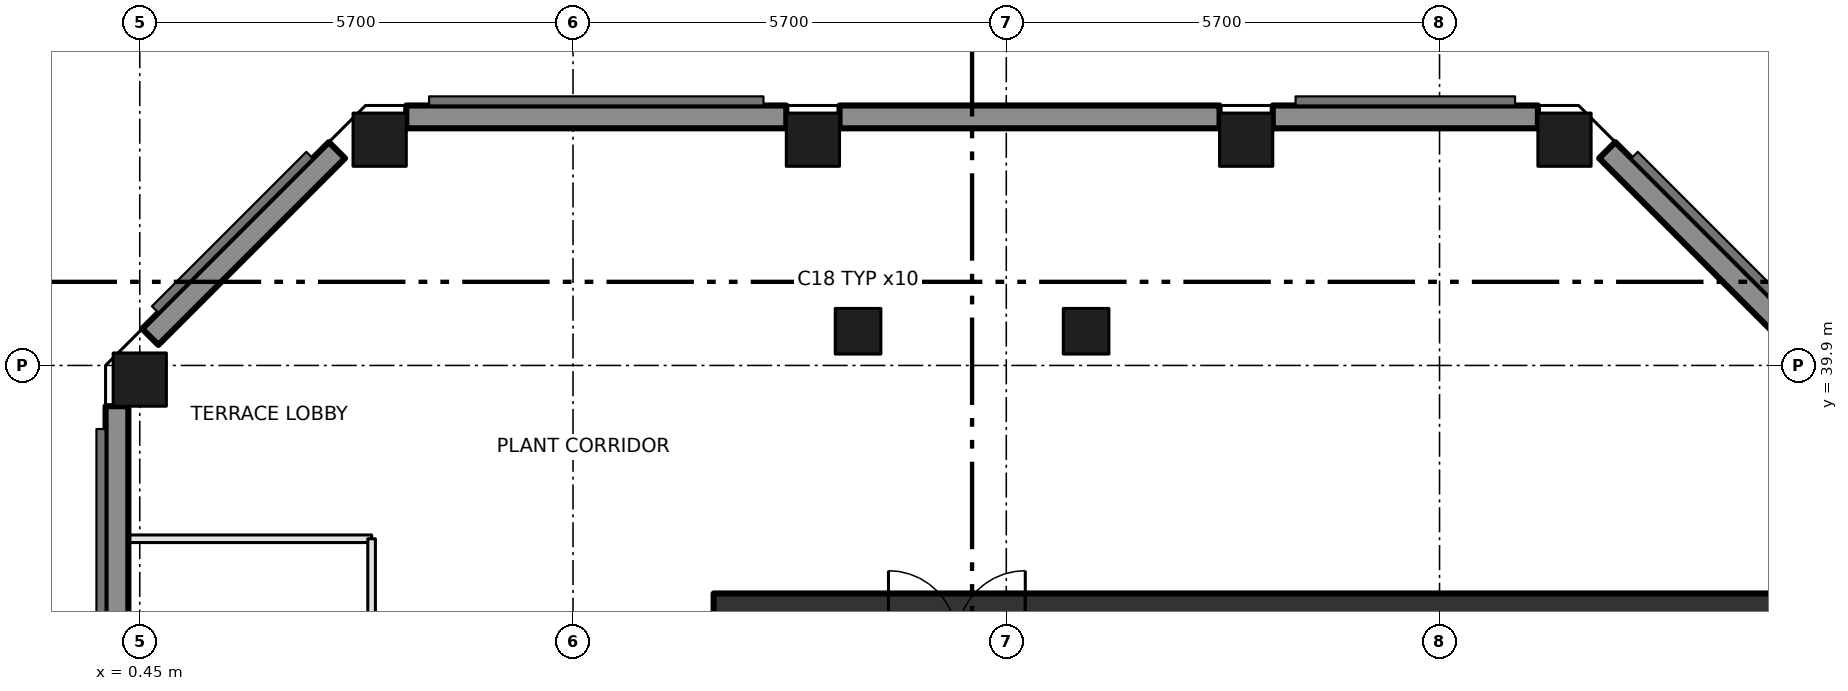
"""IFC4 building model, lengths in metres.
Left out: names, types, materials, properties, quantities, classifications, styles, units other than length and angle.
Written with IfcOpenShell. Run it as: python <this file> out.ifc"""

import sys

from ifc_helpers import new_model, si_unit, direction, frame, frame_2d, origin, origin_2d, place, context, subcontext, project, spatial, rectangle, extrude, element, save


model = new_model("IFC4")
c1 = context("Model", 3, precision=1e-05, world=origin(), true_north=direction((0.0, 1.0)))
c2 = subcontext(c1, "Body", "Model", "MODEL_VIEW")
j1 = project(units=[si_unit("LENGTHUNIT", "METRE"), si_unit("PLANEANGLEUNIT", "RADIAN")], contexts=[c1])
p1 = place(None, origin())
s1 = spatial("IfcSite", under=j1, at=p1, CompositionType="ELEMENT")
p2 = place(p1, origin())
s2 = spatial("IfcBuilding", under=s1, at=p2, CompositionType="ELEMENT")
p3 = place(p2, frame((0.0, 0.0, 414.6)))
s3 = spatial("IfcBuildingStorey", under=s2, at=p3, CompositionType="ELEMENT", Elevation=414.6)
for number, where, z_axis, x_axis in (
    (1, (19.194, 42.87, 0.0), (0.0, 0.0, 1.0), (1.0, 0.0, 0.0)),
    (2, (3.606, 42.87, 0.0), (0.0, 0.0, 1.0), (1.0, 0.0, 0.0)),
    (3, (9.306, 42.87, 0.0), (0.0, 0.0, 1.0), (1.0, 0.0, 0.0)),
    (4, (15.006, 42.87, 0.0), (0.0, 0.0, 1.0), (1.0, 0.0, 0.0)),
    (5, (0.45, 39.714, 0.0), (0.0, 0.0, 1.0), (1.0, 0.0, 0.0)),
):
    element("IfcColumn", number, at=place(p3, frame(where, z_axis=z_axis, x_axis=x_axis)), inside=s3, PredefinedType="COLUMN", context=c2, shape_type="SweptSolid", body=[
        extrude(rectangle(XDim=0.7, YDim=0.7, at=origin_2d()), origin(), (0.0, 0.0, 1.0), 4.8),
    ])
for number, where, z_axis, x_axis in (
    (6, (9.9, 40.35, 0.0), (0.0, 0.0, 1.0), (1.0, 0.0, 0.0)),
    (7, (12.9, 40.35, 0.0), (0.0, 0.0, 1.0), (1.0, 0.0, 0.0)),
):
    element("IfcColumn", number, at=place(p3, frame(where, z_axis=z_axis, x_axis=x_axis)), inside=s3, PredefinedType="COLUMN", context=c2, shape_type="SweptSolid", body=[
        extrude(rectangle(XDim=0.6, YDim=0.6, at=origin_2d()), origin(), (0.0, 0.0, 1.0), 4.8),
    ])
p4 = place(p3, frame((8.0, 36.3, -0.3), z_axis=(0.0, 0.0, 1.0), x_axis=(1.0, 0.0, 0.0)))
e8 = element("IfcWall", 8, at=p4, inside=s3, PredefinedType="SHEAR", context=c2, shape_type="SweptSolid", body=[
    extrude(rectangle(XDim=22.8, YDim=1.2, at=frame_2d((11.4, 0.0))), origin(), (0.0, 0.0, 1.0), 4.65),
])
p5 = place(p4, frame((2.3, 0.0, 0.3)))
e9 = element("IfcOpeningElement", 9, at=p5, cuts=e8, PredefinedType="OPENING", context=c2, shape_type="SweptSolid", body=[
    extrude(rectangle(XDim=1.8, YDim=2.1, at=frame_2d((0.9, 1.05))), frame((0.0, 0.61, 0.0), z_axis=(0.0, -1.0, 0.0), x_axis=(1.0, 0.0, 0.0)), (0.0, 0.0, 1.0), 1.22),
])
p6 = place(p3, frame((0.3, 37.62, 0.0), z_axis=(0.0, 0.0, 1.0), x_axis=(1.0, 0.0, 0.0)))
e10 = element("IfcWall", 10, at=p6, inside=s3, PredefinedType="PARTITIONING", context=c2, shape_type="SweptSolid", body=[
    extrude(rectangle(XDim=3.2, YDim=0.1, at=frame_2d((1.6, 0.0))), origin(), (0.0, 0.0, 1.0), 4.35),
])
p7 = place(p3, frame((3.5, 37.62, 0.0), z_axis=(0.0, 0.0, 1.0), x_axis=(0.0, -1.0, 0.0)))
e11 = element("IfcWall", 11, at=p7, inside=s3, PredefinedType="PARTITIONING", context=c2, shape_type="SweptSolid", body=[
    extrude(rectangle(XDim=24.513, YDim=0.1, at=frame_2d((12.257, 0.0))), origin(), (0.0, 0.0, 1.0), 4.35),
])
p8 = place(p7, frame((20.6, 0.0, 0.0)))
e12 = element("IfcOpeningElement", 12, at=p8, cuts=e11, PredefinedType="OPENING", context=c2, shape_type="SweptSolid", body=[
    extrude(rectangle(XDim=1.0, YDim=2.1, at=frame_2d((0.5, 1.05))), frame((0.0, 0.06, 0.0), z_axis=(0.0, -1.0, 0.0), x_axis=(1.0, 0.0, 0.0)), (0.0, 0.0, 1.0), 0.12),
])
p9 = place(p7, frame((11.0, 0.0, 0.0)))
e13 = element("IfcOpeningElement", 13, at=p9, cuts=e11, PredefinedType="OPENING", context=c2, shape_type="SweptSolid", body=[
    extrude(rectangle(XDim=1.0, YDim=2.1, at=frame_2d((0.5, 1.05))), frame((0.0, 0.06, 0.0), z_axis=(0.0, -1.0, 0.0), x_axis=(1.0, 0.0, 0.0)), (0.0, 0.0, 1.0), 0.12),
])
p10 = place(p7, frame((2.38, 0.0, 0.0)))
e14 = element("IfcOpeningElement", 14, at=p10, cuts=e11, PredefinedType="OPENING", context=c2, shape_type="SweptSolid", body=[
    extrude(rectangle(XDim=1.0, YDim=2.1, at=frame_2d((0.5, 1.05))), frame((0.0, 0.06, 0.0), z_axis=(0.0, -1.0, 0.0), x_axis=(1.0, 0.0, 0.0)), (0.0, 0.0, 1.0), 0.12),
])
p11 = place(p3, frame((22.476, 40.012, 0.0), z_axis=(0.0, 0.0, 1.0), x_axis=(-0.707106781187, 0.707106781187, 0.0)))
e15 = element("IfcWall", 15, at=p11, inside=s3, PredefinedType="SOLIDWALL", context=c2, shape_type="SweptSolid", body=[
    extrude(rectangle(XDim=3.847, YDim=0.3, at=frame_2d((1.923, 0.0))), origin(), (0.0, 0.0, 1.0), 3.7),
])
p12 = place(p3, frame((18.844, 43.17, 0.0), z_axis=(0.0, 0.0, 1.0), x_axis=(-1.0, 0.0, 0.0)))
e16 = element("IfcWall", 16, at=p12, inside=s3, PredefinedType="SOLIDWALL", context=c2, shape_type="SweptSolid", body=[
    extrude(rectangle(XDim=3.488, YDim=0.3, at=frame_2d((1.744, 0.0))), origin(), (0.0, 0.0, 1.0), 3.7),
])
for number, where, z_axis, x_axis in (
    (17, (14.656, 43.17, 0.0), (0.0, 0.0, 1.0), (-1.0, 0.0, 0.0)),
    (18, (8.956, 43.17, 0.0), (0.0, 0.0, 1.0), (-1.0, 0.0, 0.0)),
):
    element("IfcWall", number, at=place(p3, frame(where, z_axis=z_axis, x_axis=x_axis)), inside=s3, PredefinedType="SOLIDWALL", context=c2, shape_type="SweptSolid", body=[
        extrude(rectangle(XDim=5.0, YDim=0.3, at=frame_2d((2.5, 0.0))), origin(), (0.0, 0.0, 1.0), 3.7),
    ])
p13 = place(p3, frame((3.044, 42.732, 0.0), z_axis=(0.0, 0.0, 1.0), x_axis=(-0.707106781187, -0.707106781187, 0.0)))
e19 = element("IfcWall", 19, at=p13, inside=s3, PredefinedType="SOLIDWALL", context=c2, shape_type="SweptSolid", body=[
    extrude(rectangle(XDim=3.473, YDim=0.3, at=frame_2d((1.737, 0.0))), origin(), (0.0, 0.0, 1.0), 3.7),
])
p14 = place(p3, frame((0.15, 39.364, 0.0), z_axis=(0.0, 0.0, 1.0), x_axis=(0.0, -1.0, 0.0)))
e20 = element("IfcWall", 20, at=p14, inside=s3, PredefinedType="SOLIDWALL", context=c2, shape_type="SweptSolid", body=[
    extrude(rectangle(XDim=4.659, YDim=0.3, at=frame_2d((2.33, 0.0))), origin(), (0.0, 0.0, 1.0), 3.7),
])
save(model, sys.argv[1])
